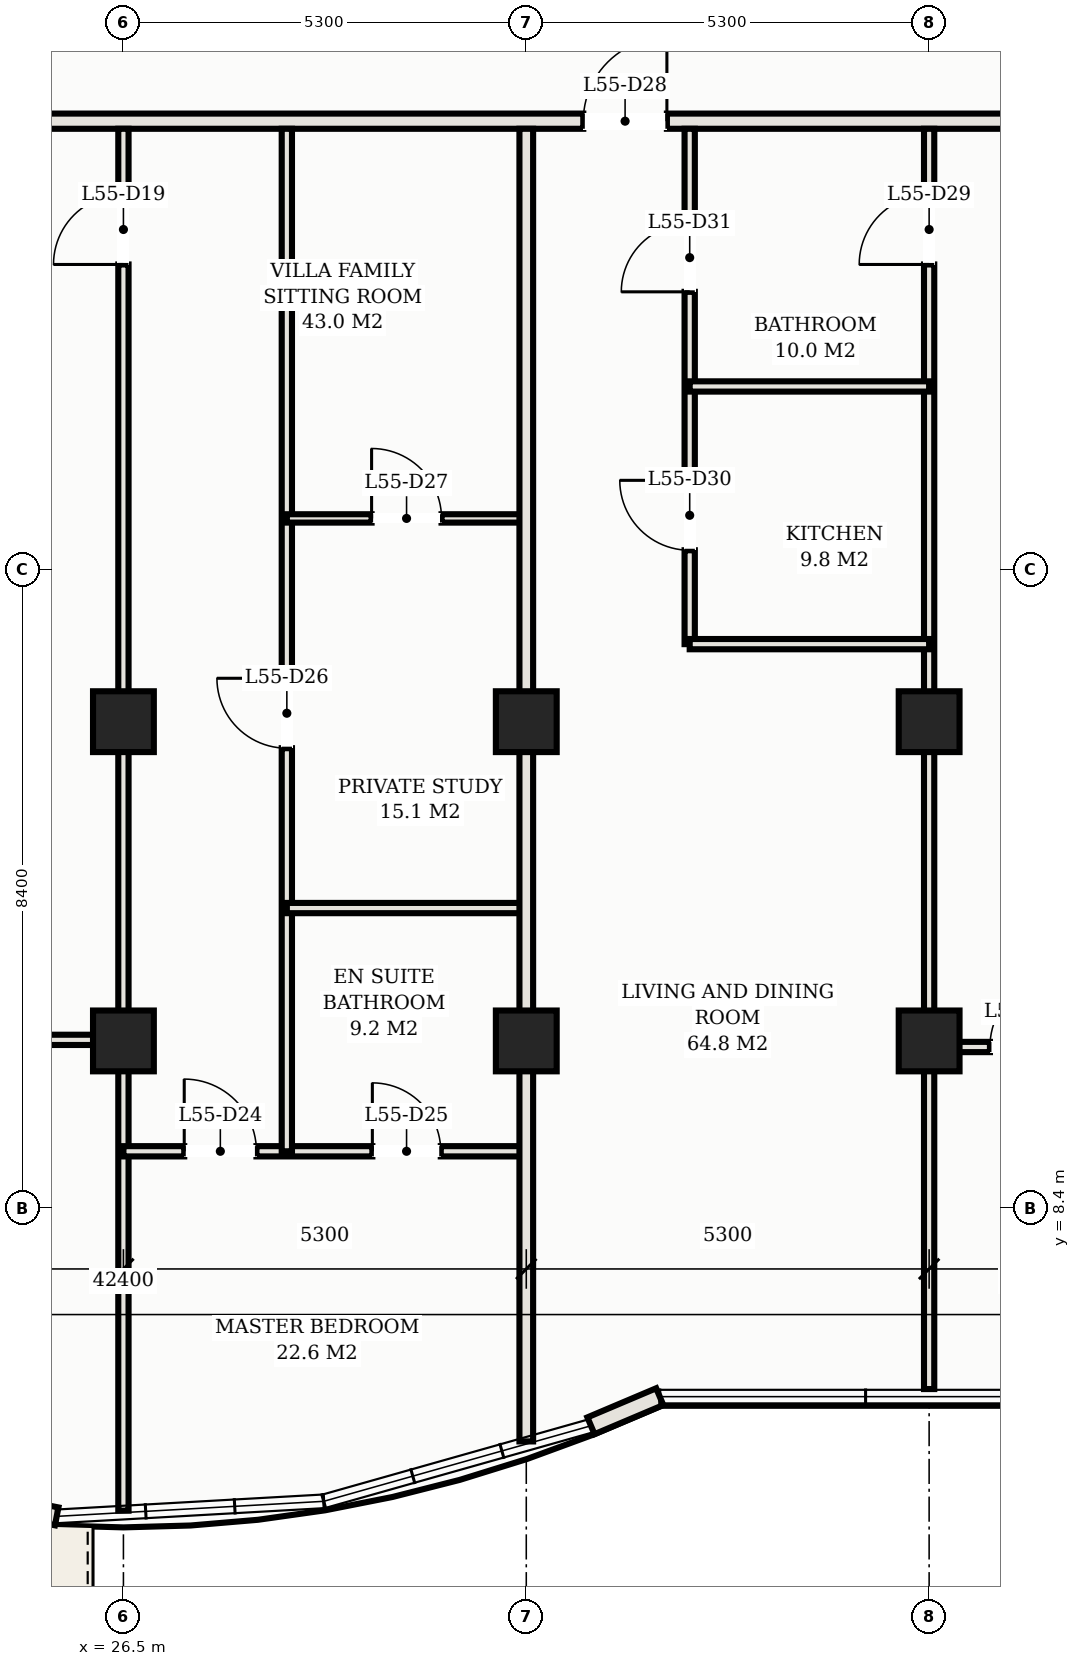
"""IFC4 building model, lengths in metres.
Left out: names, types, materials, properties, quantities, classifications, styles, units other than length and angle.
Written with IfcOpenShell. Run it as: python <this file> out.ifc"""

import sys

from ifc_helpers import new_model, si_unit, direction, frame, frame_2d, origin, origin_2d, place, context, subcontext, project, spatial, rectangle, hollow_rectangle, extrude, element, fill, save


model = new_model("IFC4")
c1 = context("Model", 3, precision=1e-05, world=origin(), true_north=direction((0.0, 1.0)))
c2 = subcontext(c1, "Body", "Model", "MODEL_VIEW")
j1 = project(units=[si_unit("LENGTHUNIT", "METRE"), si_unit("PLANEANGLEUNIT", "RADIAN")], contexts=[c1])
p1 = place(None, origin())
s1 = spatial("IfcSite", under=j1, at=p1, CompositionType="ELEMENT")
p2 = place(p1, origin())
s2 = spatial("IfcBuilding", under=s1, at=p2, CompositionType="ELEMENT")
p3 = place(p2, frame((0.0, 0.0, 203.3)))
s3 = spatial("IfcBuildingStorey", under=s2, at=p3, CompositionType="ELEMENT", Elevation=203.3)
for number, where, z_axis, x_axis in (
    (1, (26.5, 14.8, 0.0), (0.0, 0.0, 1.0), (1.0, 0.0, 0.0)),
    (2, (26.5, 10.6, 0.0), (0.0, 0.0, 1.0), (1.0, 0.0, 0.0)),
    (3, (31.8, 14.8, 0.0), (0.0, 0.0, 1.0), (1.0, 0.0, 0.0)),
    (4, (31.8, 10.6, 0.0), (0.0, 0.0, 1.0), (1.0, 0.0, 0.0)),
    (5, (37.1, 14.8, 0.0), (0.0, 0.0, 1.0), (1.0, 0.0, 0.0)),
    (6, (37.1, 10.6, 0.0), (0.0, 0.0, 1.0), (1.0, 0.0, 0.0)),
):
    element("IfcColumn", number, at=place(p3, frame(where, z_axis=z_axis, x_axis=x_axis)), inside=s3, PredefinedType="COLUMN", context=c2, shape_type="SweptSolid", body=[
        extrude(hollow_rectangle(XDim=0.8, YDim=0.8, WallThickness=0.028, at=origin_2d()), origin(), (0.0, 0.0, 1.0), 3.3),
    ])
p4 = place(p3, frame((21.229, 5.214, 0.0), z_axis=(0.0, 0.0, 1.0), x_axis=(0.980985349685, -0.194081796425, 0.0)))
e7 = element("IfcWall", 7, at=p4, inside=s3, PredefinedType="SOLIDWALL", context=c2, shape_type="SweptSolid", body=[
    extrude(rectangle(XDim=4.478, YDim=0.24, at=frame_2d((2.239, 0.0))), origin(), (0.0, 0.0, 1.0), 3.11),
])
p5 = place(p4, frame((1.473, 0.0, 0.0)))
e8 = element("IfcOpeningElement", 8, at=p5, cuts=e7, PredefinedType="OPENING", context=c2, shape_type="SweptSolid", body=[
    extrude(rectangle(XDim=1.8, YDim=2.2, at=frame_2d((0.9, 1.1))), frame((0.0, 0.13, 0.0), z_axis=(0.0, -1.0, 0.0), x_axis=(1.0, 0.0, 0.0)), (0.0, 0.0, 1.0), 0.26),
])
p6 = place(p3, frame((32.651, 5.537, 0.0), z_axis=(0.0, 0.0, 1.0), x_axis=(0.920998109395, 0.389567044924, 0.0)))
e9 = element("IfcWall", 9, at=p6, inside=s3, PredefinedType="SOLIDWALL", context=c2, shape_type="SweptSolid", body=[
    extrude(rectangle(XDim=0.983, YDim=0.24, at=frame_2d((0.491, 0.0))), origin(), (0.0, 0.0, 1.0), 3.11),
])
p7 = place(p3, frame((6.72, 22.7, 0.0), z_axis=(0.0, 0.0, 1.0), x_axis=(1.0, 0.0, 0.0)))
e10 = element("IfcWall", 10, at=p7, inside=s3, PredefinedType="PARTITIONING", context=c2, shape_type="SweptSolid", body=[
    extrude(rectangle(XDim=39.56, YDim=0.2, at=frame_2d((19.78, 0.0))), origin(), (0.0, 0.0, 1.0), 2.43),
])
p8 = place(p7, frame((4.63, 0.0, 0.0)))
e11 = element("IfcOpeningElement", 11, at=p8, cuts=e10, PredefinedType="OPENING", context=c2, shape_type="SweptSolid", body=[
    extrude(rectangle(XDim=1.1, YDim=2.25, at=frame_2d((0.55, 1.125))), frame((0.0, 0.11, 0.0), z_axis=(0.0, -1.0, 0.0), x_axis=(1.0, 0.0, 0.0)), (0.0, 0.0, 1.0), 0.22),
])
p9 = place(p7, frame((9.93, 0.0, 0.0)))
e12 = element("IfcOpeningElement", 12, at=p9, cuts=e10, PredefinedType="OPENING", context=c2, shape_type="SweptSolid", body=[
    extrude(rectangle(XDim=1.1, YDim=2.25, at=frame_2d((0.55, 1.125))), frame((0.0, 0.11, 0.0), z_axis=(0.0, -1.0, 0.0), x_axis=(1.0, 0.0, 0.0)), (0.0, 0.0, 1.0), 0.22),
])
p10 = place(p7, frame((25.83, 0.0, 0.0)))
e13 = element("IfcOpeningElement", 13, at=p10, cuts=e10, PredefinedType="OPENING", context=c2, shape_type="SweptSolid", body=[
    extrude(rectangle(XDim=1.1, YDim=2.25, at=frame_2d((0.55, 1.125))), frame((0.0, 0.11, 0.0), z_axis=(0.0, -1.0, 0.0), x_axis=(1.0, 0.0, 0.0)), (0.0, 0.0, 1.0), 0.22),
])
p11 = place(p7, frame((1.435, 0.0, 0.0)))
e14 = element("IfcOpeningElement", 14, at=p11, cuts=e10, PredefinedType="OPENING", context=c2, shape_type="SweptSolid", body=[
    extrude(rectangle(XDim=0.92, YDim=2.15, at=frame_2d((0.46, 1.075))), frame((0.0, 0.11, 0.0), z_axis=(0.0, -1.0, 0.0), x_axis=(1.0, 0.0, 0.0)), (0.0, 0.0, 1.0), 0.22),
])
p12 = place(p7, frame((37.205, 0.0, 0.0)))
e15 = element("IfcOpeningElement", 15, at=p12, cuts=e10, PredefinedType="OPENING", context=c2, shape_type="SweptSolid", body=[
    extrude(rectangle(XDim=0.92, YDim=2.15, at=frame_2d((0.46, 1.075))), frame((0.0, 0.11, 0.0), z_axis=(0.0, -1.0, 0.0), x_axis=(1.0, 0.0, 0.0)), (0.0, 0.0, 1.0), 0.22),
])
p13 = place(p3, frame((26.5, 4.42, 0.0), z_axis=(0.0, 0.0, 1.0), x_axis=(0.0, 1.0, 0.0)))
e16 = element("IfcWall", 16, at=p13, inside=s3, PredefinedType="PARTITIONING", context=c2, shape_type="SweptSolid", body=[
    extrude(rectangle(XDim=18.18, YDim=0.135, at=frame_2d((9.09, 0.0))), origin(), (0.0, 0.0, 1.0), 2.43),
])
p14 = place(p13, frame((16.395, 0.0, 0.0)))
e17 = element("IfcOpeningElement", 17, at=p14, cuts=e16, PredefinedType="OPENING", context=c2, shape_type="SweptSolid", body=[
    extrude(rectangle(XDim=0.92, YDim=2.15, at=frame_2d((0.46, 1.075))), frame((0.0, 0.078, 0.0), z_axis=(0.0, -1.0, 0.0), x_axis=(1.0, 0.0, 0.0)), (0.0, 0.0, 1.0), 0.155),
])
p15 = place(p3, frame((15.9, 10.614, 0.0), z_axis=(0.0, 0.0, 1.0), x_axis=(1.0, 0.0, 0.0)))
e18 = element("IfcWall", 18, at=p15, inside=s3, PredefinedType="PARTITIONING", context=c2, shape_type="SweptSolid", body=[
    extrude(rectangle(XDim=10.6, YDim=0.135, at=frame_2d((5.3, 0.0))), origin(), (0.0, 0.0, 1.0), 2.43),
])
p16 = place(p15, frame((0.815, 0.0, 0.0)))
e19 = element("IfcOpeningElement", 19, at=p16, cuts=e18, PredefinedType="OPENING", context=c2, shape_type="SweptSolid", body=[
    extrude(rectangle(XDim=0.92, YDim=2.15, at=frame_2d((0.46, 1.075))), frame((0.0, 0.078, 0.0), z_axis=(0.0, -1.0, 0.0), x_axis=(1.0, 0.0, 0.0)), (0.0, 0.0, 1.0), 0.155),
])
p17 = place(p3, frame((26.5, 9.148, 0.0), z_axis=(0.0, 0.0, 1.0), x_axis=(1.0, 0.0, 0.0)))
e20 = element("IfcWall", 20, at=p17, inside=s3, PredefinedType="PARTITIONING", context=c2, shape_type="SweptSolid", body=[
    extrude(rectangle(XDim=5.3, YDim=0.135, at=frame_2d((2.65, 0.0))), origin(), (0.0, 0.0, 1.0), 2.43),
])
p18 = place(p17, frame((0.8, 0.0, 0.0)))
e21 = element("IfcOpeningElement", 21, at=p18, cuts=e20, PredefinedType="OPENING", context=c2, shape_type="SweptSolid", body=[
    extrude(rectangle(XDim=0.95, YDim=2.15, at=frame_2d((0.475, 1.075))), frame((0.0, 0.078, 0.0), z_axis=(0.0, -1.0, 0.0), x_axis=(1.0, 0.0, 0.0)), (0.0, 0.0, 1.0), 0.155),
])
p19 = place(p17, frame((3.275, 0.0, 0.0)))
e22 = element("IfcOpeningElement", 22, at=p19, cuts=e20, PredefinedType="OPENING", context=c2, shape_type="SweptSolid", body=[
    extrude(rectangle(XDim=0.9, YDim=2.15, at=frame_2d((0.45, 1.075))), frame((0.0, 0.078, 0.0), z_axis=(0.0, -1.0, 0.0), x_axis=(1.0, 0.0, 0.0)), (0.0, 0.0, 1.0), 0.155),
])
p20 = place(p3, frame((28.65, 9.148, 0.0), z_axis=(0.0, 0.0, 1.0), x_axis=(0.0, 1.0, 0.0)))
e23 = element("IfcWall", 23, at=p20, inside=s3, PredefinedType="PARTITIONING", context=c2, shape_type="SweptSolid", body=[
    extrude(rectangle(XDim=13.452, YDim=0.135, at=frame_2d((6.726, 0.0))), origin(), (0.0, 0.0, 1.0), 2.43),
])
p21 = place(p20, frame((5.303, 0.0, 0.0)))
e24 = element("IfcOpeningElement", 24, at=p21, cuts=e23, PredefinedType="OPENING", context=c2, shape_type="SweptSolid", body=[
    extrude(rectangle(XDim=0.92, YDim=2.15, at=frame_2d((0.46, 1.075))), frame((0.0, 0.078, 0.0), z_axis=(0.0, -1.0, 0.0), x_axis=(1.0, 0.0, 0.0)), (0.0, 0.0, 1.0), 0.155),
])
p22 = place(p3, frame((28.65, 12.348, 0.0), z_axis=(0.0, 0.0, 1.0), x_axis=(1.0, 0.0, 0.0)))
e25 = element("IfcWall", 25, at=p22, inside=s3, PredefinedType="PARTITIONING", context=c2, shape_type="SweptSolid", body=[
    extrude(rectangle(XDim=3.15, YDim=0.135, at=frame_2d((1.575, 0.0))), origin(), (0.0, 0.0, 1.0), 2.43),
])
p23 = place(p3, frame((28.65, 17.474, 0.0), z_axis=(0.0, 0.0, 1.0), x_axis=(1.0, 0.0, 0.0)))
e26 = element("IfcWall", 26, at=p23, inside=s3, PredefinedType="MOVABLE", context=c2, shape_type="SweptSolid", body=[
    extrude(rectangle(XDim=3.15, YDim=0.11, at=frame_2d((1.575, 0.0))), origin(), (0.0, 0.0, 1.0), 2.43),
])
p24 = place(p23, frame((1.115, 0.0, 0.0)))
e27 = element("IfcOpeningElement", 27, at=p24, cuts=e26, PredefinedType="OPENING", context=c2, shape_type="SweptSolid", body=[
    extrude(rectangle(XDim=0.92, YDim=2.15, at=frame_2d((0.46, 1.075))), frame((0.0, 0.065, 0.0), z_axis=(0.0, -1.0, 0.0), x_axis=(1.0, 0.0, 0.0)), (0.0, 0.0, 1.0), 0.13),
])
p25 = place(p3, frame((31.8, 5.331, 0.0), z_axis=(0.0, 0.0, 1.0), x_axis=(0.0, 1.0, 0.0)))
e28 = element("IfcWall", 28, at=p25, inside=s3, PredefinedType="PARTITIONING", context=c2, shape_type="SweptSolid", body=[
    extrude(rectangle(XDim=17.269, YDim=0.18, at=frame_2d((8.635, 0.0))), origin(), (0.0, 0.0, 1.0), 2.43),
])
p26 = place(p3, frame((37.1, 6.02, 0.0), z_axis=(0.0, 0.0, 1.0), x_axis=(0.0, 1.0, 0.0)))
e29 = element("IfcWall", 29, at=p26, inside=s3, PredefinedType="PARTITIONING", context=c2, shape_type="SweptSolid", body=[
    extrude(rectangle(XDim=16.58, YDim=0.135, at=frame_2d((8.29, 0.0))), origin(), (0.0, 0.0, 1.0), 2.43),
])
p27 = place(p26, frame((14.795, 0.0, 0.0)))
e30 = element("IfcOpeningElement", 30, at=p27, cuts=e29, PredefinedType="OPENING", context=c2, shape_type="SweptSolid", body=[
    extrude(rectangle(XDim=0.92, YDim=2.15, at=frame_2d((0.46, 1.075))), frame((0.0, 0.078, 0.0), z_axis=(0.0, -1.0, 0.0), x_axis=(1.0, 0.0, 0.0)), (0.0, 0.0, 1.0), 0.155),
])
p28 = place(p3, frame((33.95, 15.82, 0.0), z_axis=(0.0, 0.0, 1.0), x_axis=(0.0, 1.0, 0.0)))
e31 = element("IfcWall", 31, at=p28, inside=s3, PredefinedType="PARTITIONING", context=c2, shape_type="SweptSolid", body=[
    extrude(rectangle(XDim=6.78, YDim=0.135, at=frame_2d((3.39, 0.0))), origin(), (0.0, 0.0, 1.0), 2.43),
])
p29 = place(p28, frame((1.235, 0.0, 0.0)))
e32 = element("IfcOpeningElement", 32, at=p29, cuts=e31, PredefinedType="OPENING", context=c2, shape_type="SweptSolid", body=[
    extrude(rectangle(XDim=0.92, YDim=2.15, at=frame_2d((0.46, 1.075))), frame((0.0, 0.078, 0.0), z_axis=(0.0, -1.0, 0.0), x_axis=(1.0, 0.0, 0.0)), (0.0, 0.0, 1.0), 0.155),
])
p30 = place(p28, frame((4.635, 0.0, 0.0)))
e33 = element("IfcOpeningElement", 33, at=p30, cuts=e31, PredefinedType="OPENING", context=c2, shape_type="SweptSolid", body=[
    extrude(rectangle(XDim=0.9, YDim=2.15, at=frame_2d((0.45, 1.075))), frame((0.0, 0.078, 0.0), z_axis=(0.0, -1.0, 0.0), x_axis=(1.0, 0.0, 0.0)), (0.0, 0.0, 1.0), 0.155),
])
for number, where, z_axis, x_axis in (
    (34, (33.95, 15.82, 0.0), (0.0, 0.0, 1.0), (1.0, 0.0, 0.0)),
    (35, (33.95, 19.21, 0.0), (0.0, 0.0, 1.0), (1.0, 0.0, 0.0)),
):
    element("IfcWall", number, at=place(p3, frame(where, z_axis=z_axis, x_axis=x_axis)), inside=s3, PredefinedType="PARTITIONING", context=c2, shape_type="SweptSolid", body=[
        extrude(rectangle(XDim=3.15, YDim=0.135, at=frame_2d((1.575, 0.0))), origin(), (0.0, 0.0, 1.0), 2.43),
    ])
p31 = place(p3, frame((37.1, 10.52, 0.0), z_axis=(0.0, 0.0, 1.0), x_axis=(1.0, 0.0, 0.0)))
e36 = element("IfcWall", 36, at=p31, inside=s3, PredefinedType="PARTITIONING", context=c2, shape_type="SweptSolid", body=[
    extrude(rectangle(XDim=5.3, YDim=0.135, at=frame_2d((2.65, 0.0))), origin(), (0.0, 0.0, 1.0), 2.43),
])
p32 = place(p31, frame((0.8, 0.0, 0.0)))
e37 = element("IfcOpeningElement", 37, at=p32, cuts=e36, PredefinedType="OPENING", context=c2, shape_type="SweptSolid", body=[
    extrude(rectangle(XDim=0.95, YDim=2.15, at=frame_2d((0.475, 1.075))), frame((0.0, 0.078, 0.0), z_axis=(0.0, -1.0, 0.0), x_axis=(1.0, 0.0, 0.0)), (0.0, 0.0, 1.0), 0.155),
])
p33 = place(p31, frame((2.625, 0.0, 0.0)))
e38 = element("IfcOpeningElement", 38, at=p33, cuts=e36, PredefinedType="OPENING", context=c2, shape_type="SweptSolid", body=[
    extrude(rectangle(XDim=0.9, YDim=2.15, at=frame_2d((0.45, 1.075))), frame((0.0, 0.078, 0.0), z_axis=(0.0, -1.0, 0.0), x_axis=(1.0, 0.0, 0.0)), (0.0, 0.0, 1.0), 0.155),
])
p34 = place(p14, origin())
e39 = element("IfcDoor", 39, at=p34, inside=s3, OperationType="SINGLE_SWING_LEFT", PredefinedType="DOOR", context=c2, shape_type="SweptSolid", body=[
    extrude(rectangle(XDim=0.92, YDim=2.15, at=frame_2d((0.46, 1.075))), frame((0.0, 0.025, 0.0), z_axis=(0.0, -1.0, 0.0), x_axis=(1.0, 0.0, 0.0)), (0.0, 0.0, 1.0), 0.05),
])
fill(e17, e39)
p35 = place(p18, origin())
e40 = element("IfcDoor", 40, at=p35, inside=s3, OperationType="SINGLE_SWING_LEFT", PredefinedType="DOOR", context=c2, shape_type="SweptSolid", body=[
    extrude(rectangle(XDim=0.95, YDim=2.15, at=frame_2d((0.475, 1.075))), frame((0.0, 0.025, 0.0), z_axis=(0.0, -1.0, 0.0), x_axis=(1.0, 0.0, 0.0)), (0.0, 0.0, 1.0), 0.05),
])
fill(e21, e40)
p36 = place(p19, origin())
e41 = element("IfcDoor", 41, at=p36, inside=s3, OperationType="SINGLE_SWING_LEFT", PredefinedType="DOOR", context=c2, shape_type="SweptSolid", body=[
    extrude(rectangle(XDim=0.9, YDim=2.15, at=frame_2d((0.45, 1.075))), frame((0.0, 0.025, 0.0), z_axis=(0.0, -1.0, 0.0), x_axis=(1.0, 0.0, 0.0)), (0.0, 0.0, 1.0), 0.05),
])
fill(e22, e41)
p37 = place(p21, origin())
e42 = element("IfcDoor", 42, at=p37, inside=s3, OperationType="SINGLE_SWING_RIGHT", PredefinedType="DOOR", context=c2, shape_type="SweptSolid", body=[
    extrude(rectangle(XDim=0.92, YDim=2.15, at=frame_2d((0.46, 1.075))), frame((0.0, 0.025, 0.0), z_axis=(0.0, -1.0, 0.0), x_axis=(1.0, 0.0, 0.0)), (0.0, 0.0, 1.0), 0.05),
])
fill(e24, e42)
p38 = place(p24, origin())
e43 = element("IfcDoor", 43, at=p38, inside=s3, OperationType="SINGLE_SWING_LEFT", PredefinedType="DOOR", context=c2, shape_type="SweptSolid", body=[
    extrude(rectangle(XDim=0.92, YDim=2.15, at=frame_2d((0.46, 1.075))), frame((0.0, 0.025, 0.0), z_axis=(0.0, -1.0, 0.0), x_axis=(1.0, 0.0, 0.0)), (0.0, 0.0, 1.0), 0.05),
])
fill(e27, e43)
p39 = place(p10, origin())
e44 = element("IfcDoor", 44, at=p39, inside=s3, OperationType="SINGLE_SWING_RIGHT", PredefinedType="DOOR", context=c2, shape_type="SweptSolid", body=[
    extrude(rectangle(XDim=1.1, YDim=2.25, at=frame_2d((0.55, 1.125))), frame((0.0, 0.025, 0.0), z_axis=(0.0, -1.0, 0.0), x_axis=(1.0, 0.0, 0.0)), (0.0, 0.0, 1.0), 0.05),
])
fill(e13, e44)
p40 = place(p27, origin())
e45 = element("IfcDoor", 45, at=p40, inside=s3, OperationType="SINGLE_SWING_LEFT", PredefinedType="DOOR", context=c2, shape_type="SweptSolid", body=[
    extrude(rectangle(XDim=0.92, YDim=2.15, at=frame_2d((0.46, 1.075))), frame((0.0, 0.025, 0.0), z_axis=(0.0, -1.0, 0.0), x_axis=(1.0, 0.0, 0.0)), (0.0, 0.0, 1.0), 0.05),
])
fill(e30, e45)
p41 = place(p29, origin())
e46 = element("IfcDoor", 46, at=p41, inside=s3, OperationType="SINGLE_SWING_RIGHT", PredefinedType="DOOR", context=c2, shape_type="SweptSolid", body=[
    extrude(rectangle(XDim=0.92, YDim=2.15, at=frame_2d((0.46, 1.075))), frame((0.0, 0.025, 0.0), z_axis=(0.0, -1.0, 0.0), x_axis=(1.0, 0.0, 0.0)), (0.0, 0.0, 1.0), 0.05),
])
fill(e32, e46)
p42 = place(p30, origin())
e47 = element("IfcDoor", 47, at=p42, inside=s3, OperationType="SINGLE_SWING_LEFT", PredefinedType="DOOR", context=c2, shape_type="SweptSolid", body=[
    extrude(rectangle(XDim=0.9, YDim=2.15, at=frame_2d((0.45, 1.075))), frame((0.0, 0.025, 0.0), z_axis=(0.0, -1.0, 0.0), x_axis=(1.0, 0.0, 0.0)), (0.0, 0.0, 1.0), 0.05),
])
fill(e33, e47)
p43 = place(p32, origin())
e48 = element("IfcDoor", 48, at=p43, inside=s3, OperationType="SINGLE_SWING_RIGHT", PredefinedType="DOOR", context=c2, shape_type="SweptSolid", body=[
    extrude(rectangle(XDim=0.95, YDim=2.15, at=frame_2d((0.475, 1.075))), frame((0.0, 0.025, 0.0), z_axis=(0.0, -1.0, 0.0), x_axis=(1.0, 0.0, 0.0)), (0.0, 0.0, 1.0), 0.05),
])
fill(e37, e48)
save(model, sys.argv[1])
